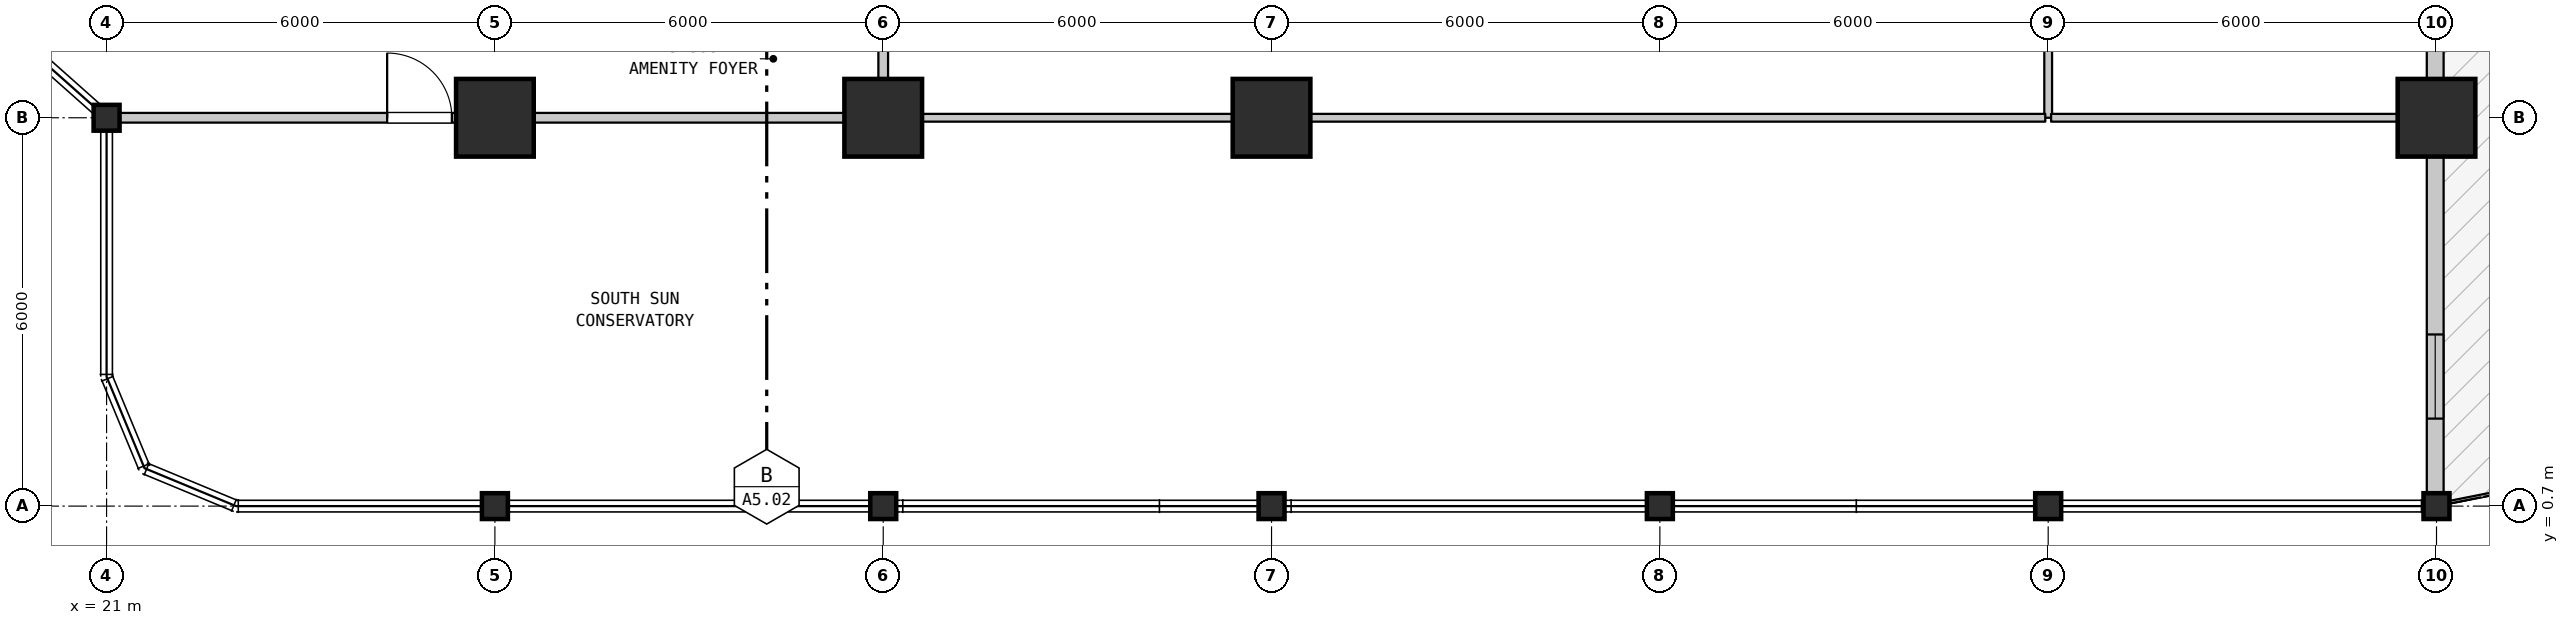
"""IFC4 building model, lengths in metres.
Left out: names, types, materials, properties, quantities, classifications, styles, units other than length and angle.
Written with IfcOpenShell. Run it as: python <this file> out.ifc"""

import sys

from ifc_helpers import new_model, si_unit, direction, frame, frame_2d, origin, origin_2d, place, context, subcontext, project, spatial, rectangle, i_section, extrude, element, fill, save


model = new_model("IFC4")
c1 = context("Model", 3, precision=1e-05, world=origin(), true_north=direction((0.0, 1.0)))
c2 = subcontext(c1, "Body", "Model", "MODEL_VIEW")
j1 = project(units=[si_unit("LENGTHUNIT", "METRE"), si_unit("PLANEANGLEUNIT", "RADIAN")], contexts=[c1])
p1 = place(None, origin())
s1 = spatial("IfcSite", under=j1, at=p1, CompositionType="ELEMENT")
p2 = place(p1, origin())
s2 = spatial("IfcBuilding", under=s1, at=p2, CompositionType="ELEMENT")
p3 = place(p2, frame((0.0, 0.0, 65.6)))
s3 = spatial("IfcBuildingStorey", under=s2, at=p3, CompositionType="ELEMENT", Elevation=65.6)
for number, where, z_axis, x_axis in (
    (1, (21.0, 6.7, 0.0), (0.0, 0.0, 1.0), (1.0, 0.0, 0.0)),
    (2, (27.0, 0.7, 0.0), (0.0, 0.0, 1.0), (1.0, 0.0, 0.0)),
):
    element("IfcColumn", number, at=place(p3, frame(where, z_axis=z_axis, x_axis=x_axis)), inside=s3, PredefinedType="COLUMN", context=c2, shape_type="SweptSolid", body=[
        extrude(i_section(OverallWidth=0.401, OverallDepth=0.399, WebThickness=0.025, FlangeThickness=0.04, FilletRadius=0.015, at=origin_2d()), origin(), (0.0, 0.0, 1.0), 4.5),
    ])
p4 = place(p3, frame((27.0, 6.7, 0.0), z_axis=(0.0, 0.0, 1.0), x_axis=(1.0, 0.0, 0.0)))
e3 = element("IfcColumn", 3, at=p4, inside=s3, PredefinedType="COLUMN", context=c2, shape_type="SweptSolid", body=[
    extrude(rectangle(XDim=1.2, YDim=1.2, at=origin_2d()), origin(), (0.0, 0.0, 1.0), 4.5),
])
p5 = place(p3, frame((33.0, 0.7, 0.0), z_axis=(0.0, 0.0, 1.0), x_axis=(1.0, 0.0, 0.0)))
e4 = element("IfcColumn", 4, at=p5, inside=s3, PredefinedType="COLUMN", context=c2, shape_type="SweptSolid", body=[
    extrude(i_section(OverallWidth=0.401, OverallDepth=0.399, WebThickness=0.025, FlangeThickness=0.04, FilletRadius=0.015, at=origin_2d()), origin(), (0.0, 0.0, 1.0), 4.5),
])
p6 = place(p3, frame((33.0, 6.7, 0.0), z_axis=(0.0, 0.0, 1.0), x_axis=(1.0, 0.0, 0.0)))
e5 = element("IfcColumn", 5, at=p6, inside=s3, PredefinedType="COLUMN", context=c2, shape_type="SweptSolid", body=[
    extrude(rectangle(XDim=1.2, YDim=1.2, at=origin_2d()), origin(), (0.0, 0.0, 1.0), 4.5),
])
p7 = place(p3, frame((39.0, 0.7, 0.0), z_axis=(0.0, 0.0, 1.0), x_axis=(1.0, 0.0, 0.0)))
e6 = element("IfcColumn", 6, at=p7, inside=s3, PredefinedType="COLUMN", context=c2, shape_type="SweptSolid", body=[
    extrude(i_section(OverallWidth=0.401, OverallDepth=0.399, WebThickness=0.025, FlangeThickness=0.04, FilletRadius=0.015, at=origin_2d()), origin(), (0.0, 0.0, 1.0), 4.5),
])
p8 = place(p3, frame((39.0, 6.7, 0.0), z_axis=(0.0, 0.0, 1.0), x_axis=(1.0, 0.0, 0.0)))
e7 = element("IfcColumn", 7, at=p8, inside=s3, PredefinedType="COLUMN", context=c2, shape_type="SweptSolid", body=[
    extrude(rectangle(XDim=1.2, YDim=1.2, at=origin_2d()), origin(), (0.0, 0.0, 1.0), 4.5),
])
for number, where, z_axis, x_axis in (
    (8, (45.0, 0.7, 0.0), (0.0, 0.0, 1.0), (1.0, 0.0, 0.0)),
    (9, (51.0, 0.7, 0.0), (0.0, 0.0, 1.0), (1.0, 0.0, 0.0)),
    (10, (57.0, 0.7, 0.0), (0.0, 0.0, 1.0), (1.0, 0.0, 0.0)),
):
    element("IfcColumn", number, at=place(p3, frame(where, z_axis=z_axis, x_axis=x_axis)), inside=s3, PredefinedType="COLUMN", context=c2, shape_type="SweptSolid", body=[
        extrude(i_section(OverallWidth=0.401, OverallDepth=0.399, WebThickness=0.025, FlangeThickness=0.04, FilletRadius=0.015, at=origin_2d()), origin(), (0.0, 0.0, 1.0), 4.5),
    ])
p9 = place(p3, frame((57.0, 6.7, 0.0), z_axis=(0.0, 0.0, 1.0), x_axis=(1.0, 0.0, 0.0)))
e11 = element("IfcColumn", 11, at=p9, inside=s3, PredefinedType="COLUMN", context=c2, shape_type="SweptSolid", body=[
    extrude(rectangle(XDim=1.2, YDim=1.2, at=origin_2d()), origin(), (0.0, 0.0, 1.0), 4.5),
])
p10 = place(p3, frame((56.98, 16.02, 0.0), z_axis=(0.0, 0.0, 1.0), x_axis=(0.0, -1.0, 0.0)))
e12 = element("IfcWall", 12, at=p10, inside=s3, PredefinedType="STANDARD", context=c2, shape_type="SweptSolid", body=[
    extrude(rectangle(XDim=15.303, YDim=0.26, at=frame_2d((7.651, 0.0))), origin(), (0.0, 0.0, 1.0), 3.685),
])
p11 = place(p10, frame((1.145, 0.0, 0.85)))
e13 = element("IfcOpeningElement", 13, at=p11, cuts=e12, PredefinedType="OPENING", context=c2, shape_type="SweptSolid", body=[
    extrude(rectangle(XDim=1.3, YDim=1.9, at=frame_2d((0.65, 0.95))), frame((0.0, 0.14, 0.0), z_axis=(0.0, -1.0, 0.0), x_axis=(1.0, 0.0, 0.0)), (0.0, 0.0, 1.0), 0.28),
])
p12 = place(p10, frame((5.286, 0.0, 0.85)))
e14 = element("IfcOpeningElement", 14, at=p12, cuts=e12, PredefinedType="OPENING", context=c2, shape_type="SweptSolid", body=[
    extrude(rectangle(XDim=1.3, YDim=1.9, at=frame_2d((0.65, 0.95))), frame((0.0, 0.14, 0.0), z_axis=(0.0, -1.0, 0.0), x_axis=(1.0, 0.0, 0.0)), (0.0, 0.0, 1.0), 0.28),
])
p13 = place(p10, frame((12.668, 0.0, 0.85)))
e15 = element("IfcOpeningElement", 15, at=p13, cuts=e12, PredefinedType="OPENING", context=c2, shape_type="SweptSolid", body=[
    extrude(rectangle(XDim=1.3, YDim=1.9, at=frame_2d((0.65, 0.95))), frame((0.0, 0.14, 0.0), z_axis=(0.0, -1.0, 0.0), x_axis=(1.0, 0.0, 0.0)), (0.0, 0.0, 1.0), 0.28),
])
p14 = place(p3, frame((33.0, 6.7, 0.0), z_axis=(0.0, 0.0, 1.0), x_axis=(0.0, 1.0, 0.0)))
e16 = element("IfcWall", 16, at=p14, inside=s3, PredefinedType="STANDARD", context=c2, shape_type="SweptSolid", body=[
    extrude(rectangle(XDim=19.2, YDim=0.15, at=frame_2d((9.6, 0.0))), origin(), (0.0, 0.0, 1.0), 3.685),
])
p15 = place(p3, frame((51.0, 6.7, 0.0), z_axis=(0.0, 0.0, 1.0), x_axis=(0.0, 1.0, 0.0)))
e17 = element("IfcWall", 17, at=p15, inside=s3, PredefinedType="PARTITIONING", context=c2, shape_type="SweptSolid", body=[
    extrude(rectangle(XDim=19.2, YDim=0.12, at=frame_2d((9.6, 0.0))), origin(), (0.0, 0.0, 1.0), 4.185),
])
p16 = place(p3, frame((21.01, 6.7, 0.0), z_axis=(0.0, 0.0, 1.0), x_axis=(1.0, 0.0, 0.0)))
e18 = element("IfcWall", 18, at=p16, inside=s3, PredefinedType="STANDARD", context=c2, shape_type="SweptSolid", body=[
    extrude(rectangle(XDim=11.93, YDim=0.15, at=frame_2d((5.965, 0.0))), origin(), (0.0, 0.0, 1.0), 3.685),
])
p17 = place(p16, frame((4.325, 0.0, 0.0)))
e19 = element("IfcOpeningElement", 19, at=p17, cuts=e18, PredefinedType="OPENING", context=c2, shape_type="SweptSolid", body=[
    extrude(rectangle(XDim=1.0, YDim=2.15, at=frame_2d((0.5, 1.075))), frame((0.0, 0.085, 0.0), z_axis=(0.0, -1.0, 0.0), x_axis=(1.0, 0.0, 0.0)), (0.0, 0.0, 1.0), 0.17),
])
p18 = place(p3, frame((33.06, 6.7, 0.0), z_axis=(0.0, 0.0, 1.0), x_axis=(1.0, 0.0, 0.0)))
e20 = element("IfcWall", 20, at=p18, inside=s3, PredefinedType="PARTITIONING", context=c2, shape_type="SweptSolid", body=[
    extrude(rectangle(XDim=5.94, YDim=0.12, at=frame_2d((2.97, 0.0))), origin(), (0.0, 0.0, 1.0), 3.685),
])
p19 = place(p3, frame((51.045, 6.7, 0.0), z_axis=(0.0, 0.0, 1.0), x_axis=(1.0, 0.0, 0.0)))
e21 = element("IfcWall", 21, at=p19, inside=s3, PredefinedType="PARTITIONING", context=c2, shape_type="SweptSolid", body=[
    extrude(rectangle(XDim=5.925, YDim=0.12, at=frame_2d((2.962, 0.0))), origin(), (0.0, 0.0, 1.0), 3.585),
])
p20 = place(p3, frame((39.0, 6.7, 0.0), z_axis=(0.0, 0.0, 1.0), x_axis=(1.0, 0.0, 0.0)))
e22 = element("IfcWall", 22, at=p20, inside=s3, PredefinedType="PARTITIONING", context=c2, shape_type="SweptSolid", body=[
    extrude(rectangle(XDim=11.955, YDim=0.12, at=frame_2d((5.978, 0.0))), origin(), (0.0, 0.0, 1.0), 3.585),
])
p21 = place(p13, origin())
e23 = element("IfcWindow", 23, at=p21, inside=s3, PartitioningType="SINGLE_PANEL", PredefinedType="WINDOW", context=c2, shape_type="SweptSolid", body=[
    extrude(rectangle(XDim=1.3, YDim=1.9, at=frame_2d((0.65, 0.95))), frame((0.0, 0.03, 0.0), z_axis=(0.0, -1.0, 0.0), x_axis=(1.0, 0.0, 0.0)), (0.0, 0.0, 1.0), 0.06),
])
fill(e15, e23)
p22 = place(p17, origin())
e24 = element("IfcDoor", 24, at=p22, inside=s3, OperationType="SINGLE_SWING_LEFT", PredefinedType="DOOR", context=c2, shape_type="SweptSolid", body=[
    extrude(rectangle(XDim=1.0, YDim=2.15, at=frame_2d((0.5, 1.075))), frame((0.0, 0.025, 0.0), z_axis=(0.0, -1.0, 0.0), x_axis=(1.0, 0.0, 0.0)), (0.0, 0.0, 1.0), 0.05),
])
fill(e19, e24)
save(model, sys.argv[1])
